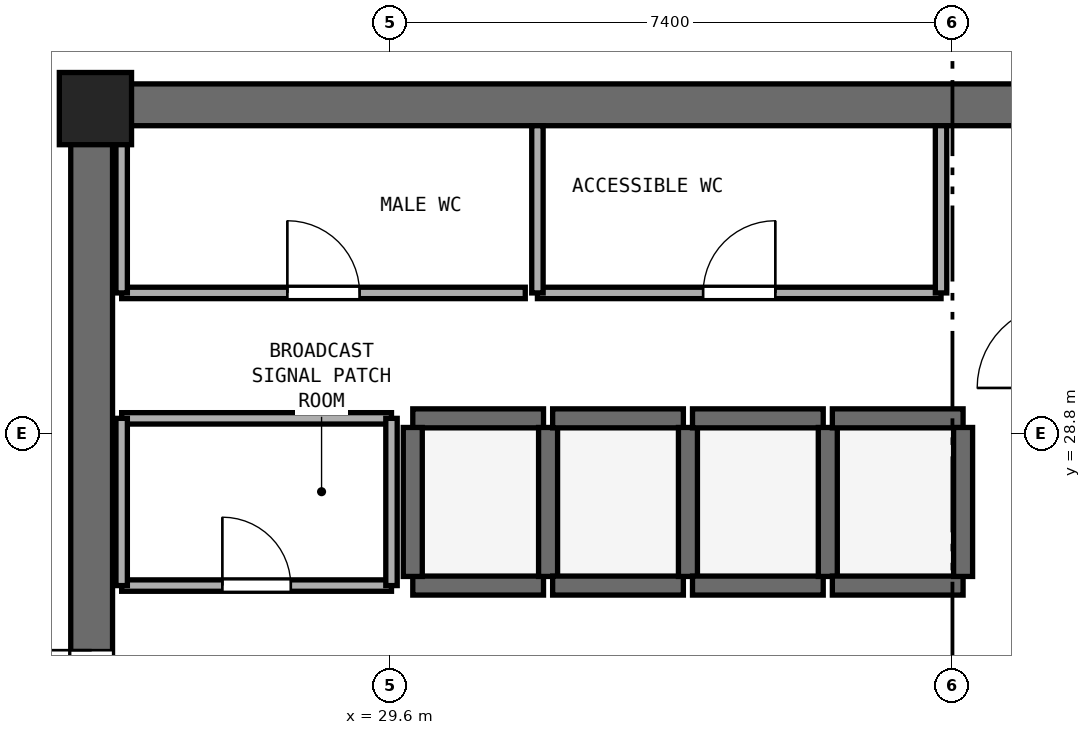
"""IFC4 building model, lengths in metres.
Left out: names, types, materials, properties, quantities, classifications, styles, units other than length and angle.
Written with IfcOpenShell. Run it as: python <this file> out.ifc"""

import sys

from ifc_helpers import new_model, si_unit, direction, frame, frame_2d, origin, origin_2d, place, context, subcontext, project, spatial, rectangle, extrude, element, fill, save


model = new_model("IFC4")
c1 = context("Model", 3, precision=1e-05, world=origin(), true_north=direction((0.0, 1.0)))
c2 = subcontext(c1, "Body", "Model", "MODEL_VIEW")
j1 = project(units=[si_unit("LENGTHUNIT", "METRE"), si_unit("PLANEANGLEUNIT", "RADIAN")], contexts=[c1])
p1 = place(None, origin())
s1 = spatial("IfcSite", under=j1, at=p1, CompositionType="ELEMENT")
p2 = place(p1, origin())
s2 = spatial("IfcBuilding", under=s1, at=p2, CompositionType="ELEMENT")
p3 = place(p2, frame((0.0, 0.0, 201.0)))
s3 = spatial("IfcBuildingStorey", under=s2, at=p3, CompositionType="ELEMENT", Elevation=201.0)
p4 = place(p3, frame((25.4, 33.125, 0.0), z_axis=(0.0, 0.0, 1.0), x_axis=(1.0, 0.0, 0.0)))
e1 = element("IfcWall", 1, at=p4, inside=s3, PredefinedType="SHEAR", context=c2, shape_type="SweptSolid", body=[
    extrude(rectangle(XDim=23.2, YDim=0.55, at=frame_2d((11.6, 0.0))), origin(), (0.0, 0.0, 1.0), 3.54),
])
p5 = place(p3, frame((25.675, 17.55, 0.0), z_axis=(0.0, 0.0, 1.0), x_axis=(0.0, 1.0, 0.0)))
e2 = element("IfcWall", 2, at=p5, inside=s3, PredefinedType="SHEAR", context=c2, shape_type="SweptSolid", body=[
    extrude(rectangle(XDim=15.3, YDim=0.55, at=frame_2d((7.65, 0.0))), origin(), (0.0, 0.0, 1.0), 3.54),
])
p6 = place(p5, frame((6.9, 0.0, 0.0)))
e3 = element("IfcOpeningElement", 3, at=p6, cuts=e2, PredefinedType="OPENING", context=c2, shape_type="SweptSolid", body=[
    extrude(rectangle(XDim=1.5, YDim=2.15, at=frame_2d((0.75, 1.075))), frame((0.0, 0.285, 0.0), z_axis=(0.0, -1.0, 0.0), x_axis=(1.0, 0.0, 0.0)), (0.0, 0.0, 1.0), 0.57),
])
p7 = place(p3, frame((25.725, 33.075, 0.0), z_axis=(0.0, 0.0, 1.0), x_axis=(1.0, 0.0, 0.0)))
e4 = element("IfcColumn", 4, at=p7, inside=s3, PredefinedType="PILASTER", context=c2, shape_type="SweptSolid", body=[
    extrude(rectangle(XDim=0.95, YDim=0.95, at=origin_2d()), origin(), (0.0, 0.0, 1.0), 3.8),
])
for number, where, z_axis, x_axis in (
    (5, (29.9, 26.8, 0.0), (0.0, 0.0, 1.0), (1.0, 0.0, 0.0)),
    (6, (29.9, 29.0, 0.0), (0.0, 0.0, 1.0), (1.0, 0.0, 0.0)),
):
    element("IfcWall", number, at=place(p3, frame(where, z_axis=z_axis, x_axis=x_axis)), inside=s3, PredefinedType="SHEAR", context=c2, shape_type="SweptSolid", body=[
        extrude(rectangle(XDim=1.72, YDim=0.25, at=frame_2d((0.86, 0.0))), origin(), (0.0, 0.0, 1.0), 3.54),
    ])
for number, where, z_axis, x_axis in (
    (7, (29.9, 26.92, 0.0), (0.0, 0.0, 1.0), (0.0, 1.0, 0.0)),
    (8, (31.68, 26.92, 0.0), (0.0, 0.0, 1.0), (0.0, 1.0, 0.0)),
):
    element("IfcWall", number, at=place(p3, frame(where, z_axis=z_axis, x_axis=x_axis)), inside=s3, PredefinedType="SHEAR", context=c2, shape_type="SweptSolid", body=[
        extrude(rectangle(XDim=1.96, YDim=0.25, at=frame_2d((0.98, 0.0))), origin(), (0.0, 0.0, 1.0), 3.54),
    ])
for number, where, z_axis, x_axis in (
    (9, (31.74, 26.8, 0.0), (0.0, 0.0, 1.0), (1.0, 0.0, 0.0)),
    (10, (31.74, 29.0, 0.0), (0.0, 0.0, 1.0), (1.0, 0.0, 0.0)),
):
    element("IfcWall", number, at=place(p3, frame(where, z_axis=z_axis, x_axis=x_axis)), inside=s3, PredefinedType="SHEAR", context=c2, shape_type="SweptSolid", body=[
        extrude(rectangle(XDim=1.72, YDim=0.25, at=frame_2d((0.86, 0.0))), origin(), (0.0, 0.0, 1.0), 3.54),
    ])
p8 = place(p3, frame((33.52, 26.92, 0.0), z_axis=(0.0, 0.0, 1.0), x_axis=(0.0, 1.0, 0.0)))
e11 = element("IfcWall", 11, at=p8, inside=s3, PredefinedType="SHEAR", context=c2, shape_type="SweptSolid", body=[
    extrude(rectangle(XDim=1.96, YDim=0.25, at=frame_2d((0.98, 0.0))), origin(), (0.0, 0.0, 1.0), 3.54),
])
for number, where, z_axis, x_axis in (
    (12, (33.58, 26.8, 0.0), (0.0, 0.0, 1.0), (1.0, 0.0, 0.0)),
    (13, (33.58, 29.0, 0.0), (0.0, 0.0, 1.0), (1.0, 0.0, 0.0)),
):
    element("IfcWall", number, at=place(p3, frame(where, z_axis=z_axis, x_axis=x_axis)), inside=s3, PredefinedType="SHEAR", context=c2, shape_type="SweptSolid", body=[
        extrude(rectangle(XDim=1.72, YDim=0.25, at=frame_2d((0.86, 0.0))), origin(), (0.0, 0.0, 1.0), 3.54),
    ])
p9 = place(p3, frame((35.36, 26.92, 0.0), z_axis=(0.0, 0.0, 1.0), x_axis=(0.0, 1.0, 0.0)))
e14 = element("IfcWall", 14, at=p9, inside=s3, PredefinedType="SHEAR", context=c2, shape_type="SweptSolid", body=[
    extrude(rectangle(XDim=1.96, YDim=0.25, at=frame_2d((0.98, 0.0))), origin(), (0.0, 0.0, 1.0), 3.54),
])
for number, where, z_axis, x_axis in (
    (15, (35.42, 26.8, 0.0), (0.0, 0.0, 1.0), (1.0, 0.0, 0.0)),
    (16, (35.42, 29.0, 0.0), (0.0, 0.0, 1.0), (1.0, 0.0, 0.0)),
):
    element("IfcWall", number, at=place(p3, frame(where, z_axis=z_axis, x_axis=x_axis)), inside=s3, PredefinedType="SHEAR", context=c2, shape_type="SweptSolid", body=[
        extrude(rectangle(XDim=1.72, YDim=0.25, at=frame_2d((0.86, 0.0))), origin(), (0.0, 0.0, 1.0), 3.54),
    ])
p10 = place(p3, frame((37.14, 26.92, 0.0), z_axis=(0.0, 0.0, 1.0), x_axis=(0.0, 1.0, 0.0)))
e17 = element("IfcWall", 17, at=p10, inside=s3, PredefinedType="SHEAR", context=c2, shape_type="SweptSolid", body=[
    extrude(rectangle(XDim=1.96, YDim=0.25, at=frame_2d((0.98, 0.0))), origin(), (0.0, 0.0, 1.0), 3.54),
])
p11 = place(p3, frame((26.07, 30.65, 0.0), z_axis=(0.0, 0.0, 1.0), x_axis=(1.0, 0.0, 0.0)))
e18 = element("IfcWall", 18, at=p11, inside=s3, PredefinedType="PARTITIONING", context=c2, shape_type="SweptSolid", body=[
    extrude(rectangle(XDim=5.31, YDim=0.15, at=frame_2d((2.655, 0.0))), origin(), (0.0, 0.0, 1.0), 3.54),
])
p12 = place(p11, frame((2.18, 0.0, 0.0)))
e19 = element("IfcOpeningElement", 19, at=p12, cuts=e18, PredefinedType="OPENING", context=c2, shape_type="SweptSolid", body=[
    extrude(rectangle(XDim=0.95, YDim=2.1, at=frame_2d((0.475, 1.05))), frame((0.0, 0.085, 0.0), z_axis=(0.0, -1.0, 0.0), x_axis=(1.0, 0.0, 0.0)), (0.0, 0.0, 1.0), 0.17),
])
p13 = place(p3, frame((26.07, 30.65, 0.0), z_axis=(0.0, 0.0, 1.0), x_axis=(0.0, 1.0, 0.0)))
e20 = element("IfcWall", 20, at=p13, inside=s3, PredefinedType="PARTITIONING", context=c2, shape_type="SweptSolid", body=[
    extrude(rectangle(XDim=2.2, YDim=0.15, at=frame_2d((1.1, 0.0))), origin(), (0.0, 0.0, 1.0), 2.64),
])
p14 = place(p3, frame((31.54, 30.65, 0.0), z_axis=(0.0, 0.0, 1.0), x_axis=(1.0, 0.0, 0.0)))
e21 = element("IfcWall", 21, at=p14, inside=s3, PredefinedType="PARTITIONING", context=c2, shape_type="SweptSolid", body=[
    extrude(rectangle(XDim=5.31, YDim=0.15, at=frame_2d((2.655, 0.0))), origin(), (0.0, 0.0, 1.0), 3.54),
])
p15 = place(p14, frame((2.18, 0.0, 0.0)))
e22 = element("IfcOpeningElement", 22, at=p15, cuts=e21, PredefinedType="OPENING", context=c2, shape_type="SweptSolid", body=[
    extrude(rectangle(XDim=0.95, YDim=2.1, at=frame_2d((0.475, 1.05))), frame((0.0, 0.085, 0.0), z_axis=(0.0, -1.0, 0.0), x_axis=(1.0, 0.0, 0.0)), (0.0, 0.0, 1.0), 0.17),
])
for number, where, z_axis, x_axis in (
    (23, (31.54, 30.65, 0.0), (0.0, 0.0, 1.0), (0.0, 1.0, 0.0)),
    (24, (36.85, 30.65, 0.0), (0.0, 0.0, 1.0), (0.0, 1.0, 0.0)),
):
    element("IfcWall", number, at=place(p3, frame(where, z_axis=z_axis, x_axis=x_axis)), inside=s3, PredefinedType="PARTITIONING", context=c2, shape_type="SweptSolid", body=[
        extrude(rectangle(XDim=2.2, YDim=0.15, at=frame_2d((1.1, 0.0))), origin(), (0.0, 0.0, 1.0), 3.54),
    ])
p16 = place(p3, frame((26.07, 26.8, 0.0), z_axis=(0.0, 0.0, 1.0), x_axis=(1.0, 0.0, 0.0)))
e25 = element("IfcWall", 25, at=p16, inside=s3, PredefinedType="PARTITIONING", context=c2, shape_type="SweptSolid", body=[
    extrude(rectangle(XDim=3.55, YDim=0.15, at=frame_2d((1.775, 0.0))), origin(), (0.0, 0.0, 1.0), 3.54),
])
p17 = place(p16, frame((1.325, 0.0, 0.0)))
e26 = element("IfcOpeningElement", 26, at=p17, cuts=e25, PredefinedType="OPENING", context=c2, shape_type="SweptSolid", body=[
    extrude(rectangle(XDim=0.9, YDim=2.1, at=frame_2d((0.45, 1.05))), frame((0.0, 0.085, 0.0), z_axis=(0.0, -1.0, 0.0), x_axis=(1.0, 0.0, 0.0)), (0.0, 0.0, 1.0), 0.17),
])
p18 = place(p3, frame((26.07, 29.0, 0.0), z_axis=(0.0, 0.0, 1.0), x_axis=(1.0, 0.0, 0.0)))
e27 = element("IfcWall", 27, at=p18, inside=s3, PredefinedType="PARTITIONING", context=c2, shape_type="SweptSolid", body=[
    extrude(rectangle(XDim=3.55, YDim=0.15, at=frame_2d((1.775, 0.0))), origin(), (0.0, 0.0, 1.0), 3.54),
])
p19 = place(p3, frame((26.07, 26.8, 0.0), z_axis=(0.0, 0.0, 1.0), x_axis=(0.0, 1.0, 0.0)))
e28 = element("IfcWall", 28, at=p19, inside=s3, PredefinedType="PARTITIONING", context=c2, shape_type="SweptSolid", body=[
    extrude(rectangle(XDim=2.2, YDim=0.15, at=frame_2d((1.1, 0.0))), origin(), (0.0, 0.0, 1.0), 2.64),
])
p20 = place(p3, frame((29.62, 26.8, 0.0), z_axis=(0.0, 0.0, 1.0), x_axis=(0.0, 1.0, 0.0)))
e29 = element("IfcWall", 29, at=p20, inside=s3, PredefinedType="PARTITIONING", context=c2, shape_type="SweptSolid", body=[
    extrude(rectangle(XDim=2.2, YDim=0.15, at=frame_2d((1.1, 0.0))), origin(), (0.0, 0.0, 1.0), 3.54),
])
p21 = place(p6, origin())
e30 = element("IfcDoor", 30, at=p21, inside=s3, OperationType="DOUBLE_DOOR_SINGLE_SWING", PredefinedType="DOOR", context=c2, shape_type="SweptSolid", body=[
    extrude(rectangle(XDim=1.5, YDim=2.15, at=frame_2d((0.75, 1.075))), frame((0.0, 0.025, 0.0), z_axis=(0.0, -1.0, 0.0), x_axis=(1.0, 0.0, 0.0)), (0.0, 0.0, 1.0), 0.05),
])
fill(e3, e30)
p22 = place(p12, origin())
e31 = element("IfcDoor", 31, at=p22, inside=s3, OperationType="SINGLE_SWING_LEFT", PredefinedType="DOOR", context=c2, shape_type="SweptSolid", body=[
    extrude(rectangle(XDim=0.95, YDim=2.1, at=frame_2d((0.475, 1.05))), frame((0.0, 0.025, 0.0), z_axis=(0.0, -1.0, 0.0), x_axis=(1.0, 0.0, 0.0)), (0.0, 0.0, 1.0), 0.05),
])
fill(e19, e31)
p23 = place(p15, origin())
e32 = element("IfcDoor", 32, at=p23, inside=s3, OperationType="SINGLE_SWING_RIGHT", PredefinedType="DOOR", context=c2, shape_type="SweptSolid", body=[
    extrude(rectangle(XDim=0.95, YDim=2.1, at=frame_2d((0.475, 1.05))), frame((0.0, 0.025, 0.0), z_axis=(0.0, -1.0, 0.0), x_axis=(1.0, 0.0, 0.0)), (0.0, 0.0, 1.0), 0.05),
])
fill(e22, e32)
p24 = place(p17, origin())
e33 = element("IfcDoor", 33, at=p24, inside=s3, OperationType="SINGLE_SWING_LEFT", PredefinedType="DOOR", context=c2, shape_type="SweptSolid", body=[
    extrude(rectangle(XDim=0.9, YDim=2.1, at=frame_2d((0.45, 1.05))), frame((0.0, 0.025, 0.0), z_axis=(0.0, -1.0, 0.0), x_axis=(1.0, 0.0, 0.0)), (0.0, 0.0, 1.0), 0.05),
])
fill(e26, e33)
save(model, sys.argv[1])
